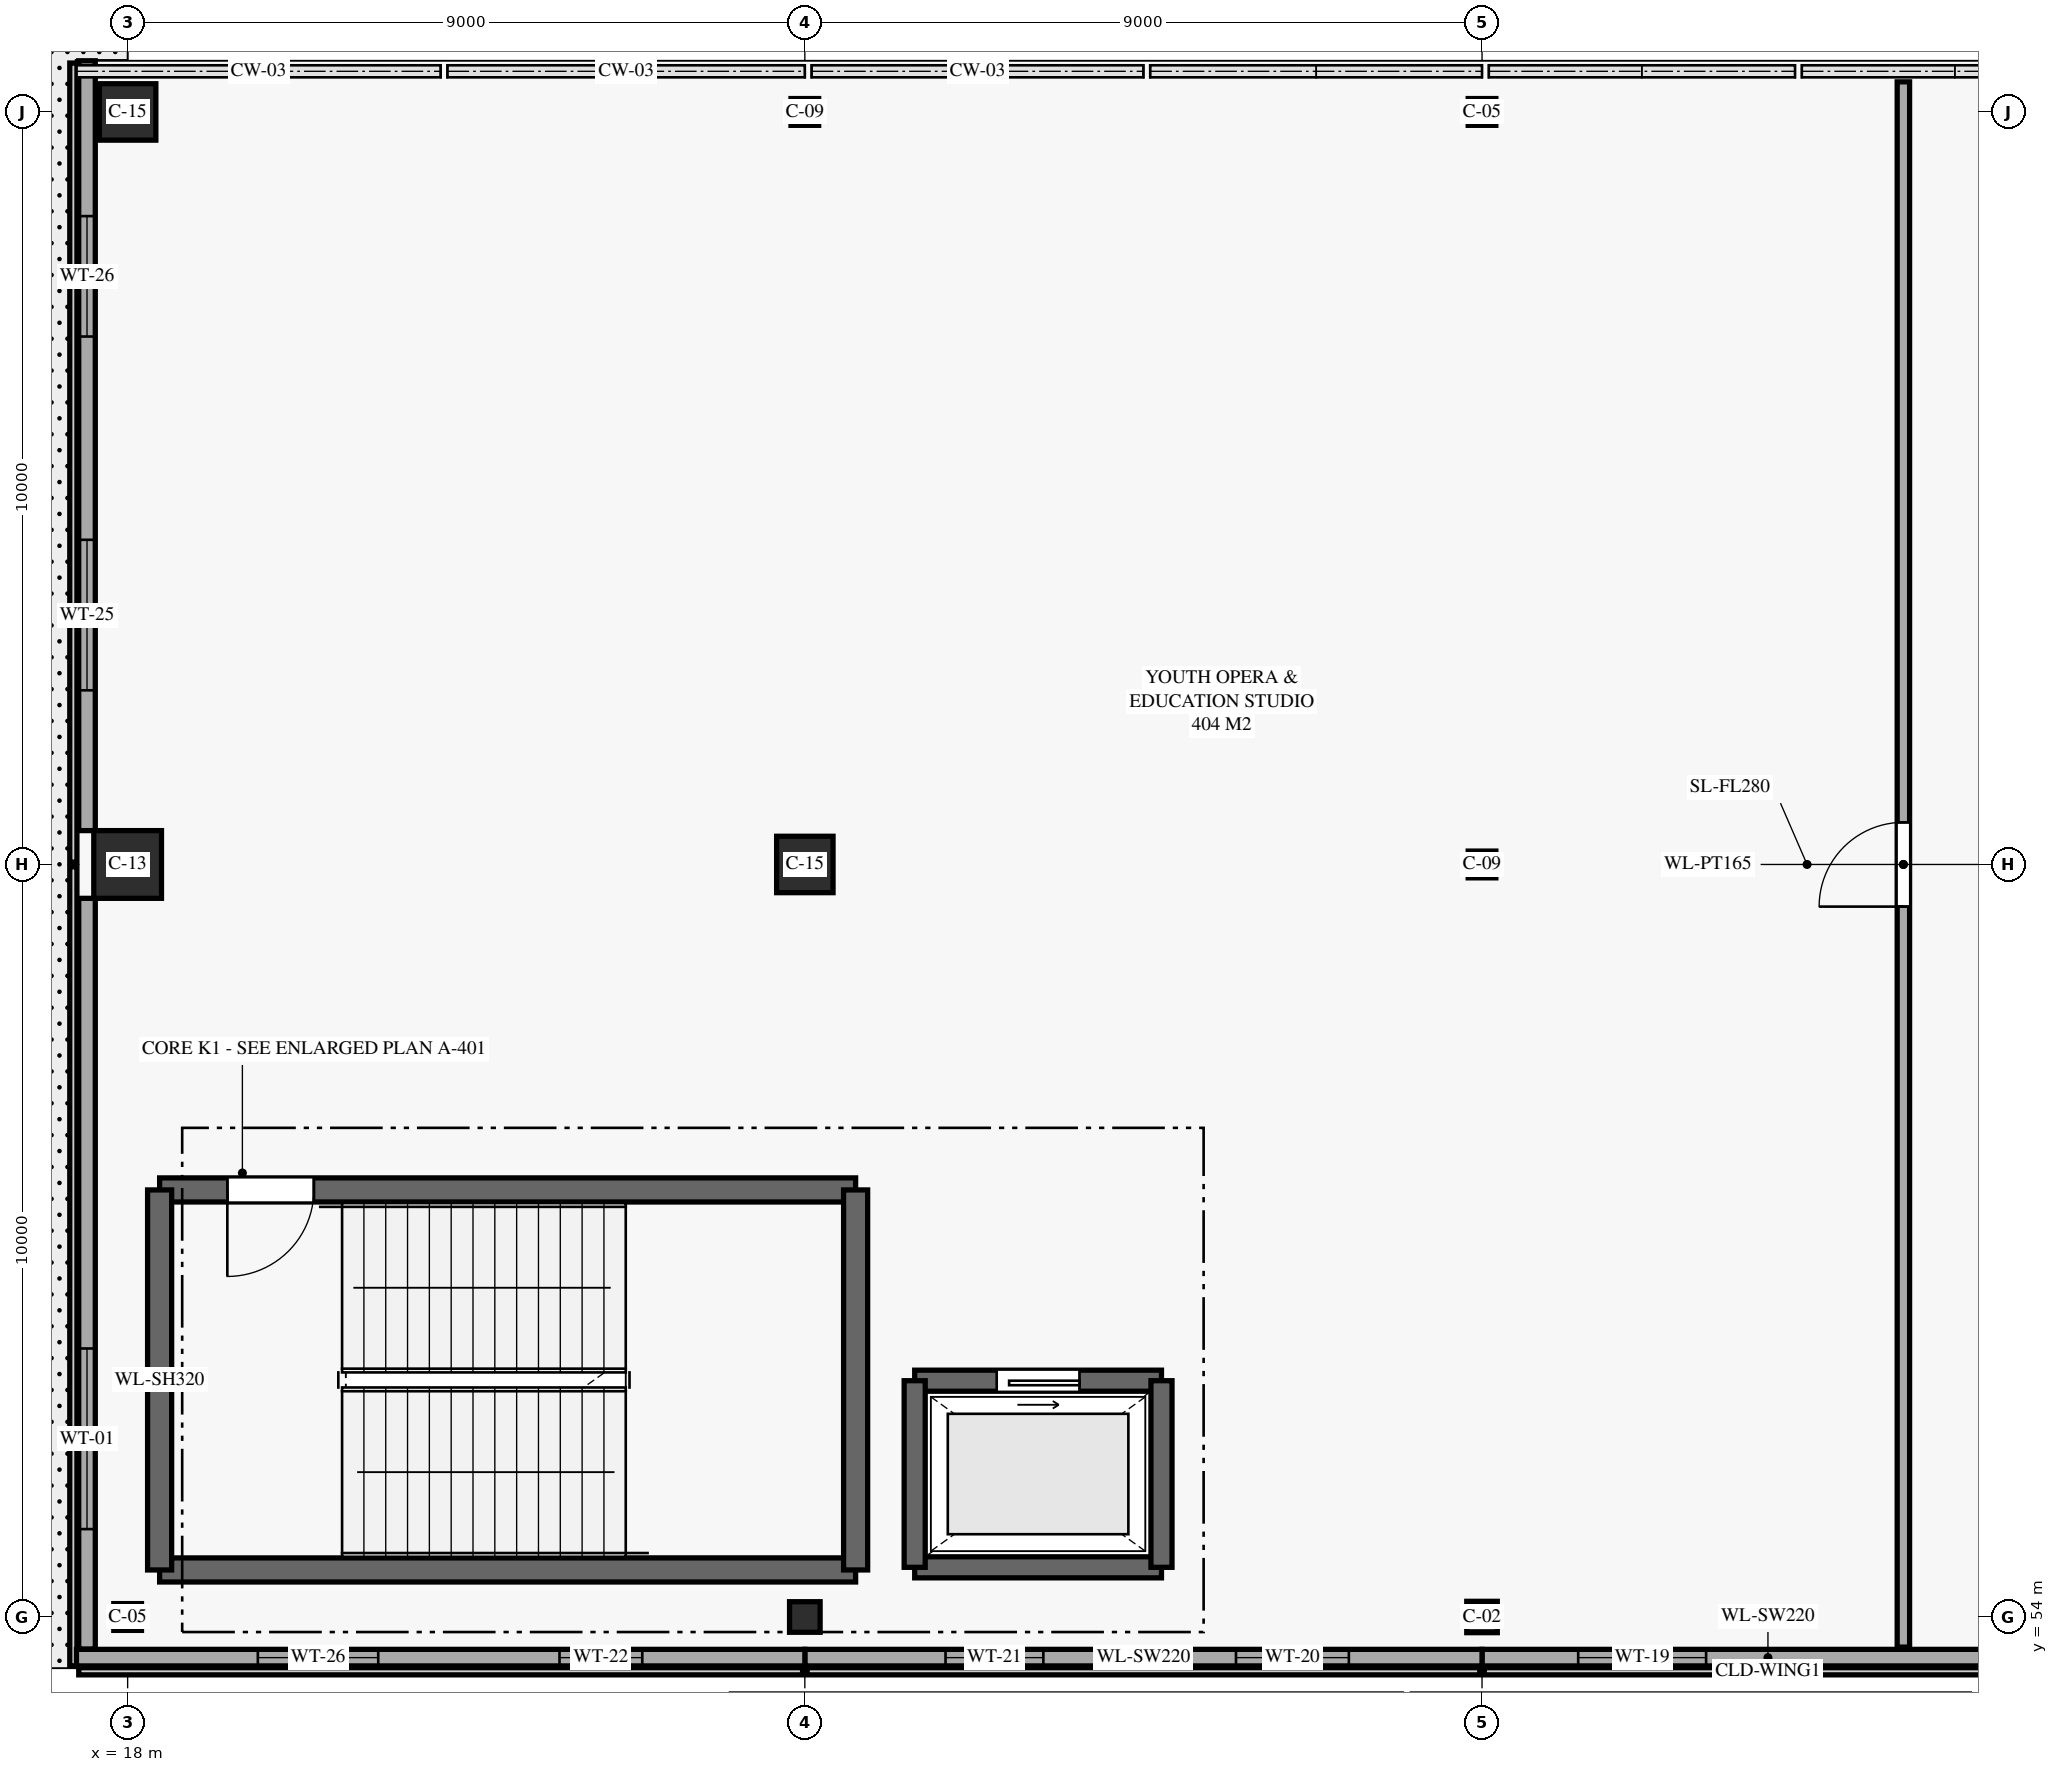
"""IFC4 building model, lengths in metres.
Left out: names, types, materials, properties, quantities, classifications, styles, units other than length and angle.
Written with IfcOpenShell. Run it as: python <this file> out.ifc"""

import sys

from ifc_helpers import new_model, si_unit, direction, frame, frame_2d, origin, origin_2d, place, context, subcontext, project, spatial, rectangle, hollow_rectangle, i_section, extrude, element, fill, save


model = new_model("IFC4")
c1 = context("Model", 3, precision=1e-05, world=origin(), true_north=direction((0.0, 1.0)))
c2 = subcontext(c1, "Body", "Model", "MODEL_VIEW")
j1 = project(units=[si_unit("LENGTHUNIT", "METRE"), si_unit("PLANEANGLEUNIT", "RADIAN")], contexts=[c1])
p1 = place(None, origin())
s1 = spatial("IfcSite", under=j1, at=p1, CompositionType="ELEMENT")
p2 = place(p1, origin())
s2 = spatial("IfcBuilding", under=s1, at=p2, CompositionType="ELEMENT")
p3 = place(p2, frame((0.0, 0.0, 20.0)))
s3 = spatial("IfcBuildingStorey", under=s2, at=p3, CompositionType="ELEMENT", Elevation=20.0)
p4 = place(p3, frame((18.0, 54.0, 0.0), z_axis=(0.0, 0.0, 1.0), x_axis=(1.0, 0.0, 0.0)))
e1 = element("IfcColumn", 1, at=p4, inside=s3, PredefinedType="COLUMN", context=c2, shape_type="SweptSolid", body=[
    extrude(i_section(OverallWidth=0.368, OverallDepth=0.356, WebThickness=0.011, FlangeThickness=0.018, FilletRadius=0.015, at=origin_2d()), origin(), (0.0, 0.0, 1.0), 4.8),
])
p5 = place(p3, frame((18.0, 64.0, 0.0), z_axis=(0.0, 0.0, 1.0), x_axis=(1.0, 0.0, 0.0)))
e2 = element("IfcColumn", 2, at=p5, inside=s3, PredefinedType="COLUMN", context=c2, shape_type="SweptSolid", body=[
    extrude(rectangle(XDim=0.9, YDim=0.9, at=origin_2d()), origin(), (0.0, 0.0, 1.0), 4.8),
])
p6 = place(p3, frame((18.0, 74.0, 0.0), z_axis=(0.0, 0.0, 1.0), x_axis=(1.0, 0.0, 0.0)))
e3 = element("IfcColumn", 3, at=p6, inside=s3, PredefinedType="COLUMN", context=c2, shape_type="SweptSolid", body=[
    extrude(rectangle(XDim=0.75, YDim=0.75, at=origin_2d()), origin(), (0.0, 0.0, 1.0), 4.8),
])
p7 = place(p3, frame((27.0, 54.0, 0.0), z_axis=(0.0, 0.0, 1.0), x_axis=(1.0, 0.0, 0.0)))
e4 = element("IfcColumn", 4, at=p7, inside=s3, PredefinedType="COLUMN", context=c2, shape_type="SweptSolid", body=[
    extrude(hollow_rectangle(XDim=0.406, YDim=0.406, WallThickness=0.015, InnerFilletRadius=0.015, OuterFilletRadius=0.03, at=origin_2d()), origin(), (0.0, 0.0, 1.0), 4.8),
])
p8 = place(p3, frame((27.0, 64.0, 0.0), z_axis=(0.0, 0.0, 1.0), x_axis=(1.0, 0.0, 0.0)))
e5 = element("IfcColumn", 5, at=p8, inside=s3, PredefinedType="COLUMN", context=c2, shape_type="SweptSolid", body=[
    extrude(rectangle(XDim=0.75, YDim=0.75, at=origin_2d()), origin(), (0.0, 0.0, 1.0), 4.8),
])
p9 = place(p3, frame((27.0, 74.0, 0.0), z_axis=(0.0, 0.0, 1.0), x_axis=(1.0, 0.0, 0.0)))
e6 = element("IfcColumn", 6, at=p9, inside=s3, PredefinedType="COLUMN", context=c2, shape_type="SweptSolid", body=[
    extrude(i_section(OverallWidth=0.368, OverallDepth=0.356, WebThickness=0.011, FlangeThickness=0.018, FilletRadius=0.015, at=origin_2d()), origin(), (0.0, 0.0, 1.0), 4.8),
])
p10 = place(p3, frame((36.0, 54.0, 0.0), z_axis=(0.0, 0.0, 1.0), x_axis=(1.0, 0.0, 0.0)))
e7 = element("IfcColumn", 7, at=p10, inside=s3, PredefinedType="COLUMN", context=c2, shape_type="SweptSolid", body=[
    extrude(i_section(OverallWidth=0.406, OverallDepth=0.417, WebThickness=0.03, FlangeThickness=0.048, FilletRadius=0.018, at=origin_2d()), origin(), (0.0, 0.0, 1.0), 4.8),
])
for number, where, z_axis, x_axis in (
    (8, (36.0, 64.0, 0.0), (0.0, 0.0, 1.0), (1.0, 0.0, 0.0)),
    (9, (36.0, 74.0, 0.0), (0.0, 0.0, 1.0), (1.0, 0.0, 0.0)),
):
    element("IfcColumn", number, at=place(p3, frame(where, z_axis=z_axis, x_axis=x_axis)), inside=s3, PredefinedType="COLUMN", context=c2, shape_type="SweptSolid", body=[
        extrude(i_section(OverallWidth=0.368, OverallDepth=0.356, WebThickness=0.011, FlangeThickness=0.018, FilletRadius=0.015, at=origin_2d()), origin(), (0.0, 0.0, 1.0), 4.8),
    ])
p11 = place(p3, frame((18.425, 54.625, 0.0), z_axis=(0.0, 0.0, 1.0), x_axis=(1.0, 0.0, 0.0)))
e10 = element("IfcWall", 10, at=p11, inside=s3, PredefinedType="SHEAR", context=c2, shape_type="SweptSolid", body=[
    extrude(rectangle(XDim=9.25, YDim=0.32, at=frame_2d((4.625, 0.0))), origin(), (0.0, 0.0, 1.0), 4.54),
])
p12 = place(p3, frame((27.675, 59.675, 0.0), z_axis=(0.0, 0.0, 1.0), x_axis=(-1.0, 0.0, 0.0)))
e11 = element("IfcWall", 11, at=p12, inside=s3, PredefinedType="SHEAR", context=c2, shape_type="SweptSolid", body=[
    extrude(rectangle(XDim=9.25, YDim=0.32, at=frame_2d((4.625, 0.0))), origin(), (0.0, 0.0, 1.0), 4.54),
])
p13 = place(p12, frame((7.2, 0.0, 0.0)))
e12 = element("IfcOpeningElement", 12, at=p13, cuts=e11, PredefinedType="OPENING", context=c2, shape_type="SweptSolid", body=[
    extrude(rectangle(XDim=1.15, YDim=2.2, at=frame_2d((0.575, 1.1))), frame((0.0, 0.17, 0.0), z_axis=(0.0, -1.0, 0.0), x_axis=(1.0, 0.0, 0.0)), (0.0, 0.0, 1.0), 0.34),
])
for number, where, z_axis, x_axis in (
    (13, (18.425, 59.675, 0.0), (0.0, 0.0, 1.0), (0.0, -1.0, 0.0)),
    (14, (27.675, 54.625, 0.0), (0.0, 0.0, 1.0), (0.0, 1.0, 0.0)),
):
    element("IfcWall", number, at=place(p3, frame(where, z_axis=z_axis, x_axis=x_axis)), inside=s3, PredefinedType="SHEAR", context=c2, shape_type="SweptSolid", body=[
        extrude(rectangle(XDim=5.05, YDim=0.32, at=frame_2d((2.525, 0.0))), origin(), (0.0, 0.0, 1.0), 4.54),
    ])
p14 = place(p3, frame((28.46, 54.66, 0.0), z_axis=(0.0, 0.0, 1.0), x_axis=(1.0, 0.0, 0.0)))
e15 = element("IfcWall", 15, at=p14, inside=s3, PredefinedType="SHEAR", context=c2, shape_type="SweptSolid", body=[
    extrude(rectangle(XDim=3.28, YDim=0.28, at=frame_2d((1.64, 0.0))), origin(), (0.0, 0.0, 1.0), 4.54),
])
p15 = place(p3, frame((31.74, 57.14, 0.0), z_axis=(0.0, 0.0, 1.0), x_axis=(-1.0, 0.0, 0.0)))
e16 = element("IfcWall", 16, at=p15, inside=s3, PredefinedType="SHEAR", context=c2, shape_type="SweptSolid", body=[
    extrude(rectangle(XDim=3.28, YDim=0.28, at=frame_2d((1.64, 0.0))), origin(), (0.0, 0.0, 1.0), 4.54),
])
p16 = place(p15, frame((1.09, 0.0, 0.0)))
e17 = element("IfcOpeningElement", 17, at=p16, cuts=e16, PredefinedType="OPENING", context=c2, shape_type="SweptSolid", body=[
    extrude(rectangle(XDim=1.1, YDim=2.2, at=frame_2d((0.55, 1.1))), frame((0.0, 0.15, 0.0), z_axis=(0.0, -1.0, 0.0), x_axis=(1.0, 0.0, 0.0)), (0.0, 0.0, 1.0), 0.3),
])
for number, where, z_axis, x_axis in (
    (18, (28.46, 57.14, 0.0), (0.0, 0.0, 1.0), (0.0, -1.0, 0.0)),
    (19, (31.74, 54.66, 0.0), (0.0, 0.0, 1.0), (0.0, 1.0, 0.0)),
):
    element("IfcWall", number, at=place(p3, frame(where, z_axis=z_axis, x_axis=x_axis)), inside=s3, PredefinedType="SHEAR", context=c2, shape_type="SweptSolid", body=[
        extrude(rectangle(XDim=2.48, YDim=0.28, at=frame_2d((1.24, 0.0))), origin(), (0.0, 0.0, 1.0), 4.54),
    ])
p17 = place(p3, frame((43.6, 53.46, 0.0), z_axis=(0.0, 0.0, 1.0), x_axis=(-1.0, 0.0, 0.0)))
e20 = element("IfcWall", 20, at=p17, inside=s3, PredefinedType="SOLIDWALL", context=c2, shape_type="SweptSolid", body=[
    extrude(rectangle(XDim=7.6, YDim=0.22, at=frame_2d((3.8, 0.0))), origin(), (0.0, 0.0, 1.0), 4.54),
])
p18 = place(p17, frame((4.622, 0.0, 0.8)))
e21 = element("IfcOpeningElement", 21, at=p18, cuts=e20, PredefinedType="OPENING", context=c2, shape_type="SweptSolid", body=[
    extrude(rectangle(XDim=1.7, YDim=1.8, at=frame_2d((0.85, 0.9))), frame((0.0, 0.12, 0.0), z_axis=(0.0, -1.0, 0.0), x_axis=(1.0, 0.0, 0.0)), (0.0, 0.0, 1.0), 0.24),
])
p19 = place(p3, frame((36.0, 53.46, 0.0), z_axis=(0.0, 0.0, 1.0), x_axis=(-1.0, 0.0, 0.0)))
e22 = element("IfcWall", 22, at=p19, inside=s3, PredefinedType="SOLIDWALL", context=c2, shape_type="SweptSolid", body=[
    extrude(rectangle(XDim=9.0, YDim=0.22, at=frame_2d((4.5, 0.0))), origin(), (0.0, 0.0, 1.0), 4.54),
])
p20 = place(p19, frame((1.77, 0.0, 0.8)))
e23 = element("IfcOpeningElement", 23, at=p20, cuts=e22, PredefinedType="OPENING", context=c2, shape_type="SweptSolid", body=[
    extrude(rectangle(XDim=1.5, YDim=1.8, at=frame_2d((0.75, 0.9))), frame((0.0, 0.12, 0.0), z_axis=(0.0, -1.0, 0.0), x_axis=(1.0, 0.0, 0.0)), (0.0, 0.0, 1.0), 0.24),
])
p21 = place(p19, frame((5.83, 0.0, 0.8)))
e24 = element("IfcOpeningElement", 24, at=p21, cuts=e22, PredefinedType="OPENING", context=c2, shape_type="SweptSolid", body=[
    extrude(rectangle(XDim=1.3, YDim=1.8, at=frame_2d((0.65, 0.9))), frame((0.0, 0.12, 0.0), z_axis=(0.0, -1.0, 0.0), x_axis=(1.0, 0.0, 0.0)), (0.0, 0.0, 1.0), 0.24),
])
p22 = place(p3, frame((27.0, 53.46, 0.0), z_axis=(0.0, 0.0, 1.0), x_axis=(-1.0, 0.0, 0.0)))
e25 = element("IfcWall", 25, at=p22, inside=s3, PredefinedType="SOLIDWALL", context=c2, shape_type="SweptSolid", body=[
    extrude(rectangle(XDim=9.68, YDim=0.22, at=frame_2d((4.84, 0.0))), origin(), (0.0, 0.0, 1.0), 4.54),
])
p23 = place(p22, frame((2.16, 0.0, 0.8)))
e26 = element("IfcOpeningElement", 26, at=p23, cuts=e25, PredefinedType="OPENING", context=c2, shape_type="SweptSolid", body=[
    extrude(rectangle(XDim=1.1, YDim=1.8, at=frame_2d((0.55, 0.9))), frame((0.0, 0.12, 0.0), z_axis=(0.0, -1.0, 0.0), x_axis=(1.0, 0.0, 0.0)), (0.0, 0.0, 1.0), 0.24),
])
p24 = place(p22, frame((5.67, 0.0, 0.8)))
e27 = element("IfcOpeningElement", 27, at=p24, cuts=e25, PredefinedType="OPENING", context=c2, shape_type="SweptSolid", body=[
    extrude(rectangle(XDim=1.6, YDim=1.5, at=frame_2d((0.8, 0.75))), frame((0.0, 0.12, 0.0), z_axis=(0.0, -1.0, 0.0), x_axis=(1.0, 0.0, 0.0)), (0.0, 0.0, 1.0), 0.24),
])
p25 = place(p3, frame((17.46, 53.575, 0.0), z_axis=(0.0, 0.0, 1.0), x_axis=(0.0, 1.0, 0.0)))
e28 = element("IfcWall", 28, at=p25, inside=s3, PredefinedType="SOLIDWALL", context=c2, shape_type="SweptSolid", body=[
    extrude(rectangle(XDim=9.975, YDim=0.22, at=frame_2d((4.988, 0.0))), origin(), (0.0, 0.0, 1.0), 4.54),
])
p26 = place(p25, frame((1.593, 0.0, 0.65)))
e29 = element("IfcOpeningElement", 29, at=p26, cuts=e28, PredefinedType="OPENING", context=c2, shape_type="SweptSolid", body=[
    extrude(rectangle(XDim=2.4, YDim=2.3, at=frame_2d((1.2, 1.15))), frame((0.0, 0.12, 0.0), z_axis=(0.0, -1.0, 0.0), x_axis=(1.0, 0.0, 0.0)), (0.0, 0.0, 1.0), 0.24),
])
p27 = place(p3, frame((17.46, 64.45, 0.0), z_axis=(0.0, 0.0, 1.0), x_axis=(0.0, 1.0, 0.0)))
e30 = element("IfcWall", 30, at=p27, inside=s3, PredefinedType="SOLIDWALL", context=c2, shape_type="SweptSolid", body=[
    extrude(rectangle(XDim=10.23, YDim=0.22, at=frame_2d((5.115, 0.0))), origin(), (0.0, 0.0, 1.0), 4.54),
])
p28 = place(p27, frame((1.865, 0.0, 0.8)))
e31 = element("IfcOpeningElement", 31, at=p28, cuts=e30, PredefinedType="OPENING", context=c2, shape_type="SweptSolid", body=[
    extrude(rectangle(XDim=2.0, YDim=1.5, at=frame_2d((1.0, 0.75))), frame((0.0, 0.12, 0.0), z_axis=(0.0, -1.0, 0.0), x_axis=(1.0, 0.0, 0.0)), (0.0, 0.0, 1.0), 0.24),
])
p29 = place(p27, frame((6.566, 0.0, 0.8)))
e32 = element("IfcOpeningElement", 32, at=p29, cuts=e30, PredefinedType="OPENING", context=c2, shape_type="SweptSolid", body=[
    extrude(rectangle(XDim=1.6, YDim=1.5, at=frame_2d((0.8, 0.75))), frame((0.0, 0.12, 0.0), z_axis=(0.0, -1.0, 0.0), x_axis=(1.0, 0.0, 0.0)), (0.0, 0.0, 1.0), 0.24),
])
p30 = place(p3, frame((41.6, 53.6, 0.0), z_axis=(0.0, 0.0, 1.0), x_axis=(0.0, 1.0, 0.0)))
e33 = element("IfcWall", 33, at=p30, inside=s3, PredefinedType="PARTITIONING", context=c2, shape_type="SweptSolid", body=[
    extrude(rectangle(XDim=20.8, YDim=0.165, at=frame_2d((10.4, 0.0))), origin(), (0.0, 0.0, 1.0), 4.54),
])
p31 = place(p30, frame((9.84, 0.0, 0.0)))
e34 = element("IfcOpeningElement", 34, at=p31, cuts=e33, PredefinedType="OPENING", context=c2, shape_type="SweptSolid", body=[
    extrude(rectangle(XDim=1.12, YDim=2.25, at=frame_2d((0.56, 1.125))), frame((0.0, 0.093, 0.0), z_axis=(0.0, -1.0, 0.0), x_axis=(1.0, 0.0, 0.0)), (0.0, 0.0, 1.0), 0.185),
])
p32 = place(p18, origin())
e35 = element("IfcWindow", 35, at=p32, inside=s3, PartitioningType="SINGLE_PANEL", PredefinedType="WINDOW", context=c2, shape_type="SweptSolid", body=[
    extrude(rectangle(XDim=1.7, YDim=1.8, at=frame_2d((0.85, 0.9))), frame((0.0, 0.03, 0.0), z_axis=(0.0, -1.0, 0.0), x_axis=(1.0, 0.0, 0.0)), (0.0, 0.0, 1.0), 0.06),
])
fill(e21, e35)
p33 = place(p20, origin())
e36 = element("IfcWindow", 36, at=p33, inside=s3, PartitioningType="SINGLE_PANEL", PredefinedType="WINDOW", context=c2, shape_type="SweptSolid", body=[
    extrude(rectangle(XDim=1.5, YDim=1.8, at=frame_2d((0.75, 0.9))), frame((0.0, 0.03, 0.0), z_axis=(0.0, -1.0, 0.0), x_axis=(1.0, 0.0, 0.0)), (0.0, 0.0, 1.0), 0.06),
])
fill(e23, e36)
p34 = place(p21, origin())
e37 = element("IfcWindow", 37, at=p34, inside=s3, PartitioningType="SINGLE_PANEL", PredefinedType="WINDOW", context=c2, shape_type="SweptSolid", body=[
    extrude(rectangle(XDim=1.3, YDim=1.8, at=frame_2d((0.65, 0.9))), frame((0.0, 0.03, 0.0), z_axis=(0.0, -1.0, 0.0), x_axis=(1.0, 0.0, 0.0)), (0.0, 0.0, 1.0), 0.06),
])
fill(e24, e37)
p35 = place(p23, origin())
e38 = element("IfcWindow", 38, at=p35, inside=s3, PartitioningType="SINGLE_PANEL", PredefinedType="WINDOW", context=c2, shape_type="SweptSolid", body=[
    extrude(rectangle(XDim=1.1, YDim=1.8, at=frame_2d((0.55, 0.9))), frame((0.0, 0.03, 0.0), z_axis=(0.0, -1.0, 0.0), x_axis=(1.0, 0.0, 0.0)), (0.0, 0.0, 1.0), 0.06),
])
fill(e26, e38)
p36 = place(p24, origin())
e39 = element("IfcWindow", 39, at=p36, inside=s3, PartitioningType="SINGLE_PANEL", PredefinedType="WINDOW", context=c2, shape_type="SweptSolid", body=[
    extrude(rectangle(XDim=1.6, YDim=1.5, at=frame_2d((0.8, 0.75))), frame((0.0, 0.03, 0.0), z_axis=(0.0, -1.0, 0.0), x_axis=(1.0, 0.0, 0.0)), (0.0, 0.0, 1.0), 0.06),
])
fill(e27, e39)
p37 = place(p26, origin())
e40 = element("IfcWindow", 40, at=p37, inside=s3, PartitioningType="SINGLE_PANEL", PredefinedType="WINDOW", context=c2, shape_type="SweptSolid", body=[
    extrude(rectangle(XDim=2.4, YDim=2.3, at=frame_2d((1.2, 1.15))), frame((0.0, 0.03, 0.0), z_axis=(0.0, -1.0, 0.0), x_axis=(1.0, 0.0, 0.0)), (0.0, 0.0, 1.0), 0.06),
])
fill(e29, e40)
p38 = place(p28, origin())
e41 = element("IfcWindow", 41, at=p38, inside=s3, PartitioningType="SINGLE_PANEL", PredefinedType="WINDOW", context=c2, shape_type="SweptSolid", body=[
    extrude(rectangle(XDim=2.0, YDim=1.5, at=frame_2d((1.0, 0.75))), frame((0.0, 0.03, 0.0), z_axis=(0.0, -1.0, 0.0), x_axis=(1.0, 0.0, 0.0)), (0.0, 0.0, 1.0), 0.06),
])
fill(e31, e41)
p39 = place(p29, origin())
e42 = element("IfcWindow", 42, at=p39, inside=s3, PartitioningType="SINGLE_PANEL", PredefinedType="WINDOW", context=c2, shape_type="SweptSolid", body=[
    extrude(rectangle(XDim=1.6, YDim=1.5, at=frame_2d((0.8, 0.75))), frame((0.0, 0.03, 0.0), z_axis=(0.0, -1.0, 0.0), x_axis=(1.0, 0.0, 0.0)), (0.0, 0.0, 1.0), 0.06),
])
fill(e32, e42)
p40 = place(p13, origin())
e43 = element("IfcDoor", 43, at=p40, inside=s3, OperationType="SINGLE_SWING_RIGHT", PredefinedType="DOOR", context=c2, shape_type="SweptSolid", body=[
    extrude(rectangle(XDim=1.15, YDim=2.2, at=frame_2d((0.575, 1.1))), frame((0.0, 0.025, 0.0), z_axis=(0.0, -1.0, 0.0), x_axis=(1.0, 0.0, 0.0)), (0.0, 0.0, 1.0), 0.05),
])
fill(e12, e43)
p41 = place(p16, origin())
e44 = element("IfcDoor", 44, at=p41, inside=s3, OperationType="SLIDING_TO_LEFT", PredefinedType="DOOR", context=c2, shape_type="SweptSolid", body=[
    extrude(rectangle(XDim=1.1, YDim=2.2, at=frame_2d((0.55, 1.1))), frame((0.0, 0.025, 0.0), z_axis=(0.0, -1.0, 0.0), x_axis=(1.0, 0.0, 0.0)), (0.0, 0.0, 1.0), 0.05),
])
fill(e17, e44)
p42 = place(p31, origin())
e45 = element("IfcDoor", 45, at=p42, inside=s3, OperationType="SINGLE_SWING_LEFT", PredefinedType="DOOR", context=c2, shape_type="SweptSolid", body=[
    extrude(rectangle(XDim=1.12, YDim=2.25, at=frame_2d((0.56, 1.125))), frame((0.0, 0.025, 0.0), z_axis=(0.0, -1.0, 0.0), x_axis=(1.0, 0.0, 0.0)), (0.0, 0.0, 1.0), 0.05),
])
fill(e34, e45)
save(model, sys.argv[1])
